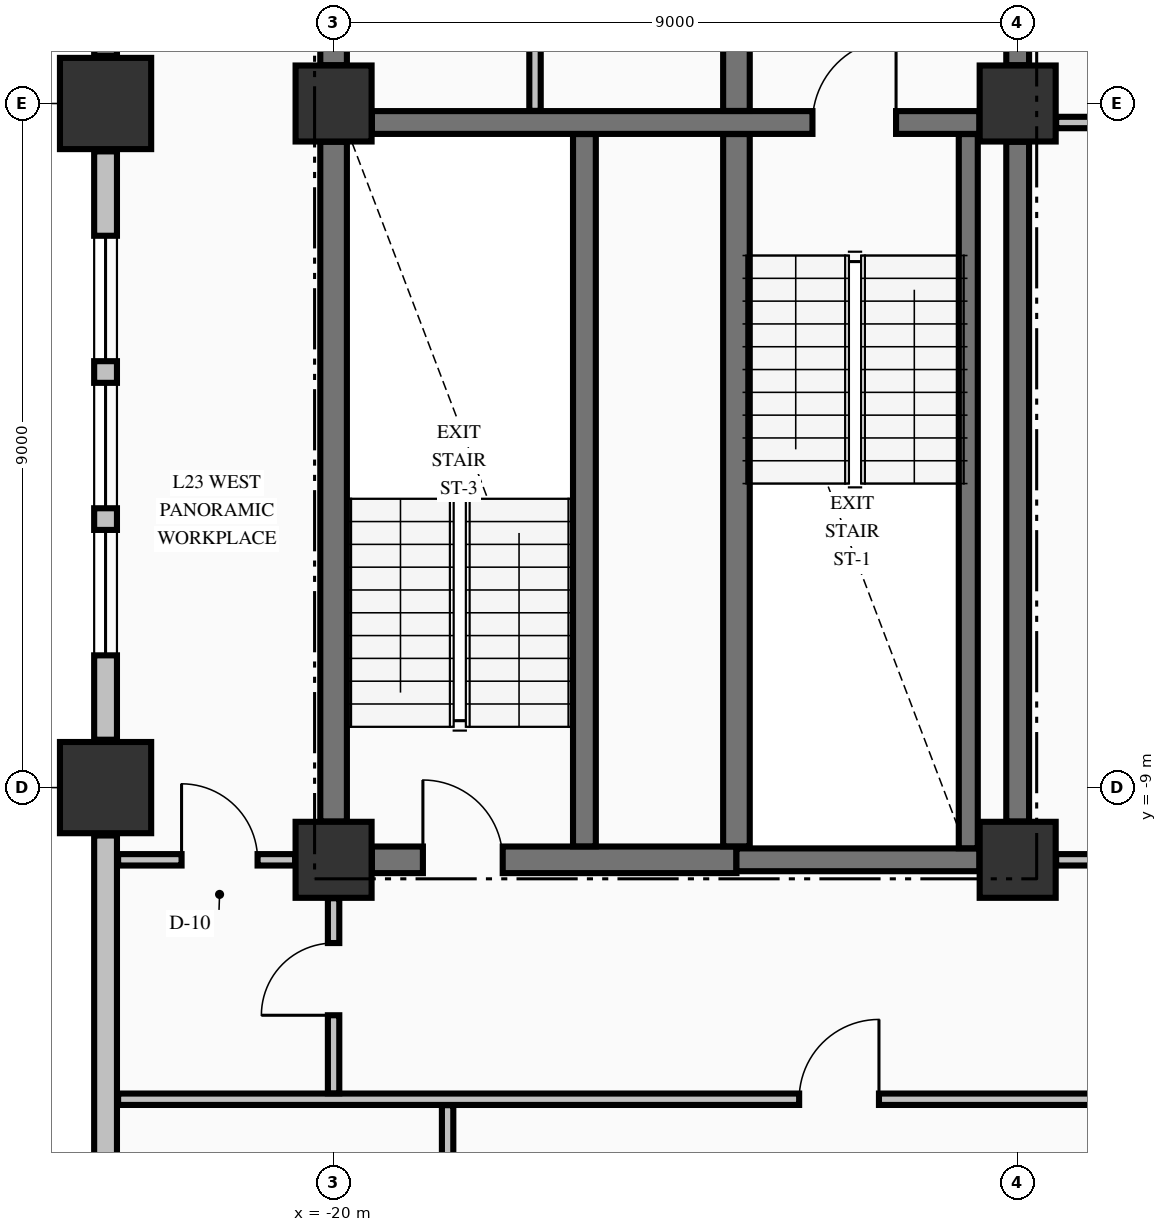
"""IFC4 building model, lengths in metres.
Left out: names, types, materials, properties, quantities, classifications, styles, units other than length and angle.
Written with IfcOpenShell. Run it as: python <this file> out.ifc"""

import sys

from ifc_helpers import new_model, si_unit, direction, frame, frame_2d, origin, origin_2d, place, context, subcontext, project, spatial, rectangle, extrude, element, fill, save


model = new_model("IFC4")
c1 = context("Model", 3, precision=1e-05, world=origin(), true_north=direction((0.0, 1.0)))
c2 = subcontext(c1, "Body", "Model", "MODEL_VIEW")
j1 = project(units=[si_unit("LENGTHUNIT", "METRE"), si_unit("PLANEANGLEUNIT", "RADIAN")], contexts=[c1])
p1 = place(None, origin())
s1 = spatial("IfcSite", under=j1, at=p1, CompositionType="ELEMENT")
p2 = place(p1, origin())
s2 = spatial("IfcBuilding", under=s1, at=p2, CompositionType="ELEMENT")
p3 = place(p2, frame((0.0, 0.0, 94.93)))
s3 = spatial("IfcBuildingStorey", under=s2, at=p3, CompositionType="ELEMENT", Elevation=94.93)
for number, where, z_axis, x_axis in (
    (1, (-23.0, -9.0, -0.25), (0.0, 0.0, 1.0), (1.0, 0.0, 0.0)),
    (2, (-23.0, 0.0, -0.25), (0.0, 0.0, 1.0), (1.0, 0.0, 0.0)),
):
    element("IfcColumn", number, at=place(p3, frame(where, z_axis=z_axis, x_axis=x_axis)), inside=s3, PredefinedType="COLUMN", context=c2, shape_type="SweptSolid", body=[
        extrude(rectangle(XDim=1.2, YDim=1.2, at=origin_2d()), origin(), (0.0, 0.0, 1.0), 3.545),
    ])
for number, where, z_axis, x_axis in (
    (3, (-20.0, -9.95, -0.25), (0.0, 0.0, 1.0), (1.0, 0.0, 0.0)),
    (4, (-11.0, -9.95, -0.25), (0.0, 0.0, 1.0), (1.0, 0.0, 0.0)),
    (5, (-11.0, 0.0, -0.25), (0.0, 0.0, 1.0), (1.0, 0.0, 0.0)),
    (6, (-20.0, 0.0, -0.25), (0.0, 0.0, 1.0), (1.0, 0.0, 0.0)),
):
    element("IfcColumn", number, at=place(p3, frame(where, z_axis=z_axis, x_axis=x_axis)), inside=s3, PredefinedType="COLUMN", context=c2, shape_type="SweptSolid", body=[
        extrude(rectangle(XDim=1.0, YDim=1.0, at=origin_2d()), origin(), (0.0, 0.0, 1.0), 3.545),
    ])
p4 = place(p3, frame((-23.0, -9.63, 0.0), z_axis=(0.0, 0.0, 1.0), x_axis=(0.0, -1.0, 0.0)))
e7 = element("IfcWall", 7, at=p4, inside=s3, PredefinedType="STANDARD", context=c2, shape_type="SweptSolid", body=[
    extrude(rectangle(XDim=10.74, YDim=0.3, at=frame_2d((5.37, 0.0))), origin(), (0.0, 0.0, 1.0), 2.687),
])
p5 = place(p3, frame((-23.0, -0.63, 0.0), z_axis=(0.0, 0.0, 1.0), x_axis=(0.0, -1.0, 0.0)))
e8 = element("IfcWall", 8, at=p5, inside=s3, PredefinedType="STANDARD", context=c2, shape_type="SweptSolid", body=[
    extrude(rectangle(XDim=7.74, YDim=0.3, at=frame_2d((3.87, 0.0))), origin(), (0.0, 0.0, 1.0), 2.687),
])
p6 = place(p5, frame((1.11, 0.0, 0.8)))
e9 = element("IfcOpeningElement", 9, at=p6, cuts=e8, PredefinedType="OPENING", context=c2, shape_type="SweptSolid", body=[
    extrude(rectangle(XDim=1.65, YDim=1.7, at=frame_2d((0.825, 0.85))), frame((0.0, 0.16, 0.0), z_axis=(0.0, -1.0, 0.0), x_axis=(1.0, 0.0, 0.0)), (0.0, 0.0, 1.0), 0.32),
])
p7 = place(p5, frame((3.045, 0.0, 0.8)))
e10 = element("IfcOpeningElement", 10, at=p7, cuts=e8, PredefinedType="OPENING", context=c2, shape_type="SweptSolid", body=[
    extrude(rectangle(XDim=1.65, YDim=1.7, at=frame_2d((0.825, 0.85))), frame((0.0, 0.16, 0.0), z_axis=(0.0, -1.0, 0.0), x_axis=(1.0, 0.0, 0.0)), (0.0, 0.0, 1.0), 0.32),
])
p8 = place(p5, frame((4.98, 0.0, 0.8)))
e11 = element("IfcOpeningElement", 11, at=p8, cuts=e8, PredefinedType="OPENING", context=c2, shape_type="SweptSolid", body=[
    extrude(rectangle(XDim=1.65, YDim=1.7, at=frame_2d((0.825, 0.85))), frame((0.0, 0.16, 0.0), z_axis=(0.0, -1.0, 0.0), x_axis=(1.0, 0.0, 0.0)), (0.0, 0.0, 1.0), 0.32),
])
p9 = place(p3, frame((-23.0, 8.37, 0.0), z_axis=(0.0, 0.0, 1.0), x_axis=(0.0, -1.0, 0.0)))
e12 = element("IfcWall", 12, at=p9, inside=s3, PredefinedType="STANDARD", context=c2, shape_type="SweptSolid", body=[
    extrude(rectangle(XDim=7.74, YDim=0.3, at=frame_2d((3.87, 0.0))), origin(), (0.0, 0.0, 1.0), 2.687),
])
p10 = place(p9, frame((1.11, 0.0, 0.8)))
e13 = element("IfcOpeningElement", 13, at=p10, cuts=e12, PredefinedType="OPENING", context=c2, shape_type="SweptSolid", body=[
    extrude(rectangle(XDim=1.65, YDim=1.7, at=frame_2d((0.825, 0.85))), frame((0.0, 0.16, 0.0), z_axis=(0.0, -1.0, 0.0), x_axis=(1.0, 0.0, 0.0)), (0.0, 0.0, 1.0), 0.32),
])
p11 = place(p9, frame((3.045, 0.0, 0.8)))
e14 = element("IfcOpeningElement", 14, at=p11, cuts=e12, PredefinedType="OPENING", context=c2, shape_type="SweptSolid", body=[
    extrude(rectangle(XDim=1.65, YDim=1.7, at=frame_2d((0.825, 0.85))), frame((0.0, 0.16, 0.0), z_axis=(0.0, -1.0, 0.0), x_axis=(1.0, 0.0, 0.0)), (0.0, 0.0, 1.0), 0.32),
])
p12 = place(p9, frame((4.98, 0.0, 0.8)))
e15 = element("IfcOpeningElement", 15, at=p12, cuts=e12, PredefinedType="OPENING", context=c2, shape_type="SweptSolid", body=[
    extrude(rectangle(XDim=1.65, YDim=1.7, at=frame_2d((0.825, 0.85))), frame((0.0, 0.16, 0.0), z_axis=(0.0, -1.0, 0.0), x_axis=(1.0, 0.0, 0.0)), (0.0, 0.0, 1.0), 0.32),
])
p13 = place(p3, frame((-19.496, -9.95, 0.0), z_axis=(0.0, 0.0, 1.0), x_axis=(1.0, 0.0, 0.0)))
e16 = element("IfcWall", 16, at=p13, inside=s3, PredefinedType="SHEAR", context=c2, shape_type="SweptSolid", body=[
    extrude(rectangle(XDim=4.796, YDim=0.35, at=frame_2d((2.398, 0.0))), origin(), (0.0, 0.0, 1.0), 3.295),
])
p14 = place(p13, frame((0.671, 0.0, 0.0)))
e17 = element("IfcOpeningElement", 17, at=p14, cuts=e16, PredefinedType="OPENING", context=c2, shape_type="SweptSolid", body=[
    extrude(rectangle(XDim=1.05, YDim=2.15, at=frame_2d((0.525, 1.075))), frame((0.0, 0.185, 0.0), z_axis=(0.0, -1.0, 0.0), x_axis=(1.0, 0.0, 0.0)), (0.0, 0.0, 1.0), 0.37),
])
p15 = place(p3, frame((-14.7, -9.95, 0.0), z_axis=(0.0, 0.0, 1.0), x_axis=(1.0, 0.0, 0.0)))
e18 = element("IfcWall", 18, at=p15, inside=s3, PredefinedType="SHEAR", context=c2, shape_type="SweptSolid", body=[
    extrude(rectangle(XDim=3.196, YDim=0.3, at=frame_2d((1.598, 0.0))), origin(), (0.0, 0.0, 1.0), 3.295),
])
p16 = place(p3, frame((-19.496, -0.25, 0.0), z_axis=(0.0, 0.0, 1.0), x_axis=(1.0, 0.0, 0.0)))
e19 = element("IfcWall", 19, at=p16, inside=s3, PredefinedType="SHEAR", context=c2, shape_type="SweptSolid", body=[
    extrude(rectangle(XDim=7.992, YDim=0.3, at=frame_2d((3.996, 0.0))), origin(), (0.0, 0.0, 1.0), 3.295),
])
p17 = place(p16, frame((5.796, 0.0, 0.0)))
e20 = element("IfcOpeningElement", 20, at=p17, cuts=e19, PredefinedType="OPENING", context=c2, shape_type="SweptSolid", body=[
    extrude(rectangle(XDim=1.1, YDim=2.15, at=frame_2d((0.55, 1.075))), frame((0.0, 0.16, 0.0), z_axis=(0.0, -1.0, 0.0), x_axis=(1.0, 0.0, 0.0)), (0.0, 0.0, 1.0), 0.32),
])
p18 = place(p3, frame((-22.835, -13.1, 0.0), z_axis=(0.0, 0.0, 1.0), x_axis=(1.0, 0.0, 0.0)))
e21 = element("IfcWall", 21, at=p18, inside=s3, PredefinedType="PARTITIONING", context=c2, shape_type="SweptSolid", body=[
    extrude(rectangle(XDim=50.67, YDim=0.15, at=frame_2d((25.335, 0.0))), origin(), (0.0, 0.0, 1.0), 3.295),
])
p19 = place(p18, frame((8.96, 0.0, 0.0)))
e22 = element("IfcOpeningElement", 22, at=p19, cuts=e21, PredefinedType="OPENING", context=c2, shape_type="SweptSolid", body=[
    extrude(rectangle(XDim=1.05, YDim=2.15, at=frame_2d((0.525, 1.075))), frame((0.0, 0.085, 0.0), z_axis=(0.0, -1.0, 0.0), x_axis=(1.0, 0.0, 0.0)), (0.0, 0.0, 1.0), 0.17),
])
p20 = place(p18, frame((20.61, 0.0, 0.0)))
e23 = element("IfcOpeningElement", 23, at=p20, cuts=e21, PredefinedType="OPENING", context=c2, shape_type="SweptSolid", body=[
    extrude(rectangle(XDim=1.05, YDim=2.15, at=frame_2d((0.525, 1.075))), frame((0.0, 0.085, 0.0), z_axis=(0.0, -1.0, 0.0), x_axis=(1.0, 0.0, 0.0)), (0.0, 0.0, 1.0), 0.17),
])
p21 = place(p18, frame((28.76, 0.0, 0.0)))
e24 = element("IfcOpeningElement", 24, at=p21, cuts=e21, PredefinedType="OPENING", context=c2, shape_type="SweptSolid", body=[
    extrude(rectangle(XDim=1.05, YDim=2.15, at=frame_2d((0.525, 1.075))), frame((0.0, 0.085, 0.0), z_axis=(0.0, -1.0, 0.0), x_axis=(1.0, 0.0, 0.0)), (0.0, 0.0, 1.0), 0.17),
])
p22 = place(p3, frame((-22.835, -9.95, 0.0), z_axis=(0.0, 0.0, 1.0), x_axis=(1.0, 0.0, 0.0)))
e25 = element("IfcWall", 25, at=p22, inside=s3, PredefinedType="PARTITIONING", context=c2, shape_type="SweptSolid", body=[
    extrude(rectangle(XDim=2.329, YDim=0.15, at=frame_2d((1.165, 0.0))), origin(), (0.0, 0.0, 1.0), 3.295),
])
p23 = place(p22, frame((0.835, 0.0, 0.0)))
e26 = element("IfcOpeningElement", 26, at=p23, cuts=e25, PredefinedType="OPENING", context=c2, shape_type="SweptSolid", body=[
    extrude(rectangle(XDim=1.0, YDim=2.15, at=frame_2d((0.5, 1.075))), frame((0.0, 0.085, 0.0), z_axis=(0.0, -1.0, 0.0), x_axis=(1.0, 0.0, 0.0)), (0.0, 0.0, 1.0), 0.17),
])
p24 = place(p3, frame((-10.494, -9.95, 0.0), z_axis=(0.0, 0.0, 1.0), x_axis=(1.0, 0.0, 0.0)))
e27 = element("IfcWall", 27, at=p24, inside=s3, PredefinedType="PARTITIONING", context=c2, shape_type="SweptSolid", body=[
    extrude(rectangle(XDim=20.988, YDim=0.15, at=frame_2d((10.494, 0.0))), origin(), (0.0, 0.0, 1.0), 3.295),
])
p25 = place(p24, frame((12.594, 0.0, 0.0)))
e28 = element("IfcOpeningElement", 28, at=p25, cuts=e27, PredefinedType="OPENING", context=c2, shape_type="SweptSolid", body=[
    extrude(rectangle(XDim=1.1, YDim=2.15, at=frame_2d((0.55, 1.075))), frame((0.0, 0.085, 0.0), z_axis=(0.0, -1.0, 0.0), x_axis=(1.0, 0.0, 0.0)), (0.0, 0.0, 1.0), 0.17),
])
p26 = place(p24, frame((18.799, 0.0, 0.0)))
e29 = element("IfcOpeningElement", 29, at=p26, cuts=e27, PredefinedType="OPENING", context=c2, shape_type="SweptSolid", body=[
    extrude(rectangle(XDim=0.95, YDim=2.15, at=frame_2d((0.475, 1.075))), frame((0.0, 0.085, 0.0), z_axis=(0.0, -1.0, 0.0), x_axis=(1.0, 0.0, 0.0)), (0.0, 0.0, 1.0), 0.17),
])
p27 = place(p3, frame((-10.494, -0.25, 0.0), z_axis=(0.0, 0.0, 1.0), x_axis=(1.0, 0.0, 0.0)))
e30 = element("IfcWall", 30, at=p27, inside=s3, PredefinedType="PARTITIONING", context=c2, shape_type="SweptSolid", body=[
    extrude(rectangle(XDim=20.988, YDim=0.15, at=frame_2d((10.494, 0.0))), origin(), (0.0, 0.0, 1.0), 3.295),
])
p28 = place(p27, frame((12.594, 0.0, 0.0)))
e31 = element("IfcOpeningElement", 31, at=p28, cuts=e30, PredefinedType="OPENING", context=c2, shape_type="SweptSolid", body=[
    extrude(rectangle(XDim=1.1, YDim=2.15, at=frame_2d((0.55, 1.075))), frame((0.0, 0.085, 0.0), z_axis=(0.0, -1.0, 0.0), x_axis=(1.0, 0.0, 0.0)), (0.0, 0.0, 1.0), 0.17),
])
p29 = place(p27, frame((5.249, 0.0, 0.0)))
e32 = element("IfcOpeningElement", 32, at=p29, cuts=e30, PredefinedType="OPENING", context=c2, shape_type="SweptSolid", body=[
    extrude(rectangle(XDim=1.05, YDim=2.15, at=frame_2d((0.525, 1.075))), frame((0.0, 0.085, 0.0), z_axis=(0.0, -1.0, 0.0), x_axis=(1.0, 0.0, 0.0)), (0.0, 0.0, 1.0), 0.17),
])
p30 = place(p27, frame((17.399, 0.0, 0.0)))
e33 = element("IfcOpeningElement", 33, at=p30, cuts=e30, PredefinedType="OPENING", context=c2, shape_type="SweptSolid", body=[
    extrude(rectangle(XDim=0.95, YDim=2.15, at=frame_2d((0.475, 1.075))), frame((0.0, 0.085, 0.0), z_axis=(0.0, -1.0, 0.0), x_axis=(1.0, 0.0, 0.0)), (0.0, 0.0, 1.0), 0.17),
])
p31 = place(p3, frame((-20.0, -9.446, 0.0), z_axis=(0.0, 0.0, 1.0), x_axis=(0.0, 1.0, 0.0)))
e34 = element("IfcWall", 34, at=p31, inside=s3, PredefinedType="SHEAR", context=c2, shape_type="SweptSolid", body=[
    extrude(rectangle(XDim=8.942, YDim=0.35, at=frame_2d((4.471, 0.0))), origin(), (0.0, 0.0, 1.0), 3.295),
])
p32 = place(p3, frame((-20.0, 0.504, 0.0), z_axis=(0.0, 0.0, 1.0), x_axis=(0.0, 1.0, 0.0)))
e35 = element("IfcWall", 35, at=p32, inside=s3, PredefinedType="SHEAR", context=c2, shape_type="SweptSolid", body=[
    extrude(rectangle(XDim=9.492, YDim=0.35, at=frame_2d((4.746, 0.0))), origin(), (0.0, 0.0, 1.0), 3.295),
])
p33 = place(p3, frame((-16.7, -9.773, 0.0), z_axis=(0.0, 0.0, 1.0), x_axis=(0.0, 1.0, 0.0)))
e36 = element("IfcWall", 36, at=p33, inside=s3, PredefinedType="SHEAR", context=c2, shape_type="SweptSolid", body=[
    extrude(rectangle(XDim=9.371, YDim=0.3, at=frame_2d((4.686, 0.0))), origin(), (0.0, 0.0, 1.0), 3.295),
])
p34 = place(p3, frame((-14.7, -9.773, 0.0), z_axis=(0.0, 0.0, 1.0), x_axis=(0.0, 1.0, 0.0)))
e37 = element("IfcWall", 37, at=p34, inside=s3, PredefinedType="SHEAR", context=c2, shape_type="SweptSolid", body=[
    extrude(rectangle(XDim=9.371, YDim=0.35, at=frame_2d((4.686, 0.0))), origin(), (0.0, 0.0, 1.0), 3.295),
])
p35 = place(p3, frame((-14.7, -0.098, 0.0), z_axis=(0.0, 0.0, 1.0), x_axis=(0.0, 1.0, 0.0)))
e38 = element("IfcWall", 38, at=p35, inside=s3, PredefinedType="SHEAR", context=c2, shape_type="SweptSolid", body=[
    extrude(rectangle(XDim=2.846, YDim=0.35, at=frame_2d((1.423, 0.0))), origin(), (0.0, 0.0, 1.0), 3.295),
])
p36 = place(p3, frame((-11.65, -9.798, 0.0), z_axis=(0.0, 0.0, 1.0), x_axis=(0.0, 1.0, 0.0)))
e39 = element("IfcWall", 39, at=p36, inside=s3, PredefinedType="SOLIDWALL", context=c2, shape_type="SweptSolid", body=[
    extrude(rectangle(XDim=9.396, YDim=0.25, at=frame_2d((4.698, 0.0))), origin(), (0.0, 0.0, 1.0), 3.295),
])
p37 = place(p3, frame((-11.0, -9.446, 0.0), z_axis=(0.0, 0.0, 1.0), x_axis=(0.0, 1.0, 0.0)))
e40 = element("IfcWall", 40, at=p37, inside=s3, PredefinedType="SHEAR", context=c2, shape_type="SweptSolid", body=[
    extrude(rectangle(XDim=8.942, YDim=0.3, at=frame_2d((4.471, 0.0))), origin(), (0.0, 0.0, 1.0), 3.295),
])
p38 = place(p3, frame((-11.0, 0.504, 0.0), z_axis=(0.0, 0.0, 1.0), x_axis=(0.0, 1.0, 0.0)))
e41 = element("IfcWall", 41, at=p38, inside=s3, PredefinedType="SHEAR", context=c2, shape_type="SweptSolid", body=[
    extrude(rectangle(XDim=2.244, YDim=0.3, at=frame_2d((1.122, 0.0))), origin(), (0.0, 0.0, 1.0), 3.295),
])
p39 = place(p38, frame((0.596, 0.0, 0.0)))
e42 = element("IfcOpeningElement", 42, at=p39, cuts=e41, PredefinedType="OPENING", context=c2, shape_type="SweptSolid", body=[
    extrude(rectangle(XDim=1.1, YDim=2.15, at=frame_2d((0.55, 1.075))), frame((0.0, 0.16, 0.0), z_axis=(0.0, -1.0, 0.0), x_axis=(1.0, 0.0, 0.0)), (0.0, 0.0, 1.0), 0.32),
])
p40 = place(p3, frame((-20.0, -13.022, 0.0), z_axis=(0.0, 0.0, 1.0), x_axis=(0.0, 1.0, 0.0)))
e43 = element("IfcWall", 43, at=p40, inside=s3, PredefinedType="PARTITIONING", context=c2, shape_type="SweptSolid", body=[
    extrude(rectangle(XDim=2.566, YDim=0.15, at=frame_2d((1.283, 0.0))), origin(), (0.0, 0.0, 1.0), 2.785),
])
p41 = place(p40, frame((1.027, 0.0, 0.0)))
e44 = element("IfcOpeningElement", 44, at=p41, cuts=e43, PredefinedType="OPENING", context=c2, shape_type="SweptSolid", body=[
    extrude(rectangle(XDim=0.95, YDim=2.15, at=frame_2d((0.475, 1.075))), frame((0.0, 0.085, 0.0), z_axis=(0.0, -1.0, 0.0), x_axis=(1.0, 0.0, 0.0)), (0.0, 0.0, 1.0), 0.17),
])
p42 = place(p3, frame((-18.5, -20.394, 0.0), z_axis=(0.0, 0.0, 1.0), x_axis=(0.0, 1.0, 0.0)))
e45 = element("IfcWall", 45, at=p42, inside=s3, PredefinedType="PARTITIONING", context=c2, shape_type="SweptSolid", body=[
    extrude(rectangle(XDim=7.216, YDim=0.15, at=frame_2d((3.608, 0.0))), origin(), (0.0, 0.0, 1.0), 3.295),
])
p43 = place(p3, frame((-17.35, -0.097, 0.0), z_axis=(0.0, 0.0, 1.0), x_axis=(0.0, 1.0, 0.0)))
e46 = element("IfcWall", 46, at=p43, inside=s3, PredefinedType="PARTITIONING", context=c2, shape_type="SweptSolid", body=[
    extrude(rectangle(XDim=10.419, YDim=0.15, at=frame_2d((5.209, 0.0))), origin(), (0.0, 0.0, 1.0), 3.295),
])
p44 = place(p6, origin())
e47 = element("IfcWindow", 47, at=p44, inside=s3, PartitioningType="SINGLE_PANEL", PredefinedType="WINDOW", context=c2, shape_type="SweptSolid", body=[
    extrude(rectangle(XDim=1.65, YDim=1.7, at=frame_2d((0.825, 0.85))), frame((0.0, 0.03, 0.0), z_axis=(0.0, -1.0, 0.0), x_axis=(1.0, 0.0, 0.0)), (0.0, 0.0, 1.0), 0.06),
])
fill(e9, e47)
p45 = place(p7, origin())
e48 = element("IfcWindow", 48, at=p45, inside=s3, PartitioningType="SINGLE_PANEL", PredefinedType="WINDOW", context=c2, shape_type="SweptSolid", body=[
    extrude(rectangle(XDim=1.65, YDim=1.7, at=frame_2d((0.825, 0.85))), frame((0.0, 0.03, 0.0), z_axis=(0.0, -1.0, 0.0), x_axis=(1.0, 0.0, 0.0)), (0.0, 0.0, 1.0), 0.06),
])
fill(e10, e48)
p46 = place(p8, origin())
e49 = element("IfcWindow", 49, at=p46, inside=s3, PartitioningType="SINGLE_PANEL", PredefinedType="WINDOW", context=c2, shape_type="SweptSolid", body=[
    extrude(rectangle(XDim=1.65, YDim=1.7, at=frame_2d((0.825, 0.85))), frame((0.0, 0.03, 0.0), z_axis=(0.0, -1.0, 0.0), x_axis=(1.0, 0.0, 0.0)), (0.0, 0.0, 1.0), 0.06),
])
fill(e11, e49)
p47 = place(p17, origin())
e50 = element("IfcDoor", 50, at=p47, inside=s3, OperationType="SINGLE_SWING_RIGHT", PredefinedType="DOOR", context=c2, shape_type="SweptSolid", body=[
    extrude(rectangle(XDim=1.1, YDim=2.15, at=frame_2d((0.55, 1.075))), frame((0.0, 0.025, 0.0), z_axis=(0.0, -1.0, 0.0), x_axis=(1.0, 0.0, 0.0)), (0.0, 0.0, 1.0), 0.05),
])
fill(e20, e50)
p48 = place(p14, origin())
e51 = element("IfcDoor", 51, at=p48, inside=s3, OperationType="SINGLE_SWING_LEFT", PredefinedType="DOOR", context=c2, shape_type="SweptSolid", body=[
    extrude(rectangle(XDim=1.05, YDim=2.15, at=frame_2d((0.525, 1.075))), frame((0.0, 0.025, 0.0), z_axis=(0.0, -1.0, 0.0), x_axis=(1.0, 0.0, 0.0)), (0.0, 0.0, 1.0), 0.05),
])
fill(e17, e51)
p49 = place(p19, origin())
e52 = element("IfcDoor", 52, at=p49, inside=s3, OperationType="SINGLE_SWING_RIGHT", PredefinedType="DOOR", context=c2, shape_type="SweptSolid", body=[
    extrude(rectangle(XDim=1.05, YDim=2.15, at=frame_2d((0.525, 1.075))), frame((0.0, 0.025, 0.0), z_axis=(0.0, -1.0, 0.0), x_axis=(1.0, 0.0, 0.0)), (0.0, 0.0, 1.0), 0.05),
])
fill(e22, e52)
p50 = place(p41, origin())
e53 = element("IfcDoor", 53, at=p50, inside=s3, OperationType="SINGLE_SWING_LEFT", PredefinedType="DOOR", context=c2, shape_type="SweptSolid", body=[
    extrude(rectangle(XDim=0.95, YDim=2.15, at=frame_2d((0.475, 1.075))), frame((0.0, 0.025, 0.0), z_axis=(0.0, -1.0, 0.0), x_axis=(1.0, 0.0, 0.0)), (0.0, 0.0, 1.0), 0.05),
])
fill(e44, e53)
p51 = place(p23, origin())
e54 = element("IfcDoor", 54, at=p51, inside=s3, OperationType="SINGLE_SWING_LEFT", PredefinedType="DOOR", context=c2, shape_type="SweptSolid", body=[
    extrude(rectangle(XDim=1.0, YDim=2.15, at=frame_2d((0.5, 1.075))), frame((0.0, 0.025, 0.0), z_axis=(0.0, -1.0, 0.0), x_axis=(1.0, 0.0, 0.0)), (0.0, 0.0, 1.0), 0.05),
])
fill(e26, e54)
save(model, sys.argv[1])
